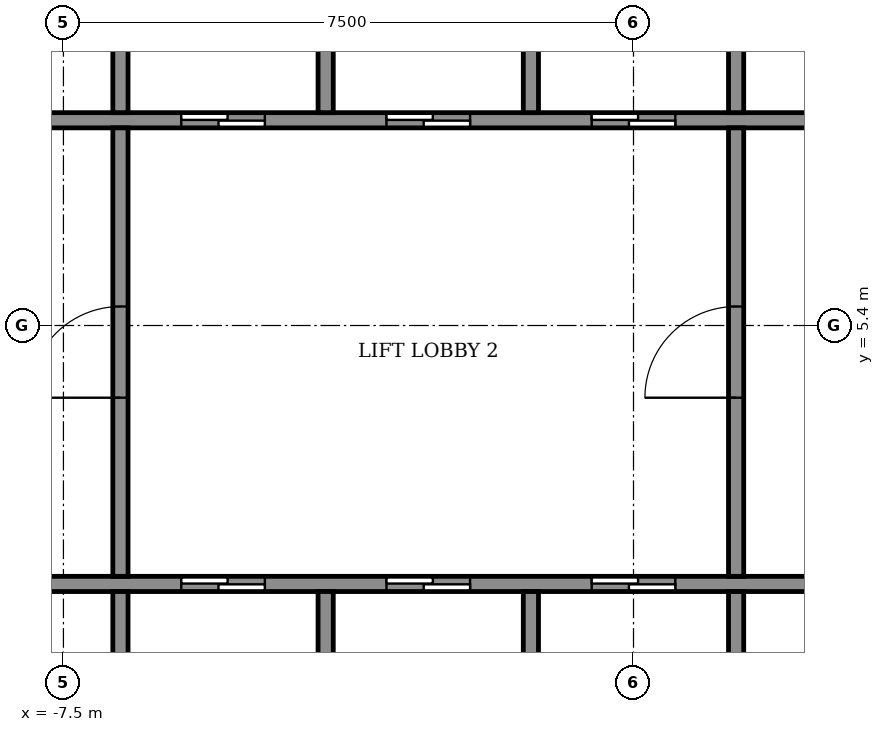
"""IFC4 building model, lengths in metres.
Left out: names, types, materials, properties, quantities, classifications, styles, units other than length and angle.
Written with IfcOpenShell. Run it as: python <this file> out.ifc"""

import sys

from ifc_helpers import new_model, si_unit, direction, frame, frame_2d, origin, place, context, subcontext, project, spatial, rectangle, extrude, element, fill, save


model = new_model("IFC4")
c1 = context("Model", 3, precision=1e-05, world=origin(), true_north=direction((0.0, 1.0)))
c2 = subcontext(c1, "Body", "Model", "MODEL_VIEW")
j1 = project(units=[si_unit("LENGTHUNIT", "METRE"), si_unit("PLANEANGLEUNIT", "RADIAN")], contexts=[c1])
p1 = place(None, origin())
s1 = spatial("IfcSite", under=j1, at=p1, CompositionType="ELEMENT")
p2 = place(p1, origin())
s2 = spatial("IfcBuilding", under=s1, at=p2, CompositionType="ELEMENT")
p3 = place(p2, frame((0.0, 0.0, 245.5)))
s3 = spatial("IfcBuildingStorey", under=s2, at=p3, CompositionType="ELEMENT", Elevation=245.5)
p4 = place(p3, frame((-10.9, 2.0, 0.0), z_axis=(0.0, 0.0, 1.0), x_axis=(1.0, 0.0, 0.0)))
e1 = element("IfcWall", 1, at=p4, inside=s3, PredefinedType="SHEAR", context=c2, shape_type="SweptSolid", body=[
    extrude(rectangle(XDim=21.8, YDim=0.2, at=frame_2d((10.9, 0.0))), origin(), (0.0, 0.0, 1.0), 3.05),
])
p5 = place(p4, frame((4.95, 0.0, 0.0)))
e2 = element("IfcOpeningElement", 2, at=p5, cuts=e1, PredefinedType="OPENING", context=c2, shape_type="SweptSolid", body=[
    extrude(rectangle(XDim=1.1, YDim=2.1, at=frame_2d((0.55, 1.05))), frame((0.0, 0.11, 0.0), z_axis=(0.0, -1.0, 0.0), x_axis=(1.0, 0.0, 0.0)), (0.0, 0.0, 1.0), 0.22),
])
p6 = place(p4, frame((7.65, 0.0, 0.0)))
e3 = element("IfcOpeningElement", 3, at=p6, cuts=e1, PredefinedType="OPENING", context=c2, shape_type="SweptSolid", body=[
    extrude(rectangle(XDim=1.1, YDim=2.1, at=frame_2d((0.55, 1.05))), frame((0.0, 0.11, 0.0), z_axis=(0.0, -1.0, 0.0), x_axis=(1.0, 0.0, 0.0)), (0.0, 0.0, 1.0), 0.22),
])
p7 = place(p4, frame((10.35, 0.0, 0.0)))
e4 = element("IfcOpeningElement", 4, at=p7, cuts=e1, PredefinedType="OPENING", context=c2, shape_type="SweptSolid", body=[
    extrude(rectangle(XDim=1.1, YDim=2.1, at=frame_2d((0.55, 1.05))), frame((0.0, 0.11, 0.0), z_axis=(0.0, -1.0, 0.0), x_axis=(1.0, 0.0, 0.0)), (0.0, 0.0, 1.0), 0.22),
])
p8 = place(p4, frame((1.675, 0.0, 0.0)))
e5 = element("IfcOpeningElement", 5, at=p8, cuts=e1, PredefinedType="OPENING", context=c2, shape_type="SweptSolid", body=[
    extrude(rectangle(XDim=0.9, YDim=2.1, at=frame_2d((0.45, 1.05))), frame((0.0, 0.11, 0.0), z_axis=(0.0, -1.0, 0.0), x_axis=(1.0, 0.0, 0.0)), (0.0, 0.0, 1.0), 0.22),
])
p9 = place(p4, frame((14.5, 0.0, 0.0)))
e6 = element("IfcOpeningElement", 6, at=p9, cuts=e1, PredefinedType="OPENING", context=c2, shape_type="SweptSolid", body=[
    extrude(rectangle(XDim=0.9, YDim=2.1, at=frame_2d((0.45, 1.05))), frame((0.0, 0.11, 0.0), z_axis=(0.0, -1.0, 0.0), x_axis=(1.0, 0.0, 0.0)), (0.0, 0.0, 1.0), 0.22),
])
p10 = place(p4, frame((19.225, 0.0, 0.0)))
e7 = element("IfcOpeningElement", 7, at=p10, cuts=e1, PredefinedType="OPENING", context=c2, shape_type="SweptSolid", body=[
    extrude(rectangle(XDim=0.9, YDim=2.1, at=frame_2d((0.45, 1.05))), frame((0.0, 0.11, 0.0), z_axis=(0.0, -1.0, 0.0), x_axis=(1.0, 0.0, 0.0)), (0.0, 0.0, 1.0), 0.22),
])
p11 = place(p3, frame((-10.9, 8.1, 0.0), z_axis=(0.0, 0.0, 1.0), x_axis=(1.0, 0.0, 0.0)))
e8 = element("IfcWall", 8, at=p11, inside=s3, PredefinedType="SHEAR", context=c2, shape_type="SweptSolid", body=[
    extrude(rectangle(XDim=21.8, YDim=0.2, at=frame_2d((10.9, 0.0))), origin(), (0.0, 0.0, 1.0), 3.05),
])
p12 = place(p11, frame((4.95, 0.0, 0.0)))
e9 = element("IfcOpeningElement", 9, at=p12, cuts=e8, PredefinedType="OPENING", context=c2, shape_type="SweptSolid", body=[
    extrude(rectangle(XDim=1.1, YDim=2.1, at=frame_2d((0.55, 1.05))), frame((0.0, 0.11, 0.0), z_axis=(0.0, -1.0, 0.0), x_axis=(1.0, 0.0, 0.0)), (0.0, 0.0, 1.0), 0.22),
])
p13 = place(p11, frame((7.65, 0.0, 0.0)))
e10 = element("IfcOpeningElement", 10, at=p13, cuts=e8, PredefinedType="OPENING", context=c2, shape_type="SweptSolid", body=[
    extrude(rectangle(XDim=1.1, YDim=2.1, at=frame_2d((0.55, 1.05))), frame((0.0, 0.11, 0.0), z_axis=(0.0, -1.0, 0.0), x_axis=(1.0, 0.0, 0.0)), (0.0, 0.0, 1.0), 0.22),
])
p14 = place(p11, frame((10.35, 0.0, 0.0)))
e11 = element("IfcOpeningElement", 11, at=p14, cuts=e8, PredefinedType="OPENING", context=c2, shape_type="SweptSolid", body=[
    extrude(rectangle(XDim=1.1, YDim=2.1, at=frame_2d((0.55, 1.05))), frame((0.0, 0.11, 0.0), z_axis=(0.0, -1.0, 0.0), x_axis=(1.0, 0.0, 0.0)), (0.0, 0.0, 1.0), 0.22),
])
p15 = place(p11, frame((1.675, 0.0, 0.0)))
e12 = element("IfcOpeningElement", 12, at=p15, cuts=e8, PredefinedType="OPENING", context=c2, shape_type="SweptSolid", body=[
    extrude(rectangle(XDim=0.9, YDim=2.1, at=frame_2d((0.45, 1.05))), frame((0.0, 0.11, 0.0), z_axis=(0.0, -1.0, 0.0), x_axis=(1.0, 0.0, 0.0)), (0.0, 0.0, 1.0), 0.22),
])
p16 = place(p11, frame((14.5, 0.0, 0.0)))
e13 = element("IfcOpeningElement", 13, at=p16, cuts=e8, PredefinedType="OPENING", context=c2, shape_type="SweptSolid", body=[
    extrude(rectangle(XDim=0.9, YDim=2.1, at=frame_2d((0.45, 1.05))), frame((0.0, 0.11, 0.0), z_axis=(0.0, -1.0, 0.0), x_axis=(1.0, 0.0, 0.0)), (0.0, 0.0, 1.0), 0.22),
])
p17 = place(p11, frame((19.225, 0.0, 0.0)))
e14 = element("IfcOpeningElement", 14, at=p17, cuts=e8, PredefinedType="OPENING", context=c2, shape_type="SweptSolid", body=[
    extrude(rectangle(XDim=0.9, YDim=2.1, at=frame_2d((0.45, 1.05))), frame((0.0, 0.11, 0.0), z_axis=(0.0, -1.0, 0.0), x_axis=(1.0, 0.0, 0.0)), (0.0, 0.0, 1.0), 0.22),
])
for number, where, z_axis, x_axis in (
    (15, (-6.75, -0.6, 0.0), (0.0, 0.0, 1.0), (0.0, 1.0, 0.0)),
    (16, (-4.05, -0.6, 0.0), (0.0, 0.0, 1.0), (0.0, 1.0, 0.0)),
    (17, (-1.35, -0.6, 0.0), (0.0, 0.0, 1.0), (0.0, 1.0, 0.0)),
    (18, (1.35, -0.6, 0.0), (0.0, 0.0, 1.0), (0.0, 1.0, 0.0)),
):
    element("IfcWall", number, at=place(p3, frame(where, z_axis=z_axis, x_axis=x_axis)), inside=s3, PredefinedType="SHEAR", context=c2, shape_type="SweptSolid", body=[
        extrude(rectangle(XDim=2.5, YDim=0.2, at=frame_2d((1.25, 0.0))), origin(), (0.0, 0.0, 1.0), 3.05),
    ])
for number, where, z_axis, x_axis in (
    (19, (-6.75, 8.2, 0.0), (0.0, 0.0, 1.0), (0.0, 1.0, 0.0)),
    (20, (-4.05, 8.2, 0.0), (0.0, 0.0, 1.0), (0.0, 1.0, 0.0)),
    (21, (-1.35, 8.2, 0.0), (0.0, 0.0, 1.0), (0.0, 1.0, 0.0)),
    (22, (1.35, 8.2, 0.0), (0.0, 0.0, 1.0), (0.0, 1.0, 0.0)),
):
    element("IfcWall", number, at=place(p3, frame(where, z_axis=z_axis, x_axis=x_axis)), inside=s3, PredefinedType="SHEAR", context=c2, shape_type="SweptSolid", body=[
        extrude(rectangle(XDim=2.6, YDim=0.2, at=frame_2d((1.3, 0.0))), origin(), (0.0, 0.0, 1.0), 3.05),
    ])
p18 = place(p3, frame((-6.75, 2.1, 0.0), z_axis=(0.0, 0.0, 1.0), x_axis=(0.0, 1.0, 0.0)))
e23 = element("IfcWall", 23, at=p18, inside=s3, PredefinedType="STANDARD", context=c2, shape_type="SweptSolid", body=[
    extrude(rectangle(XDim=5.9, YDim=0.2, at=frame_2d((2.95, 0.0))), origin(), (0.0, 0.0, 1.0), 3.05),
])
p19 = place(p18, frame((2.35, 0.0, 0.0)))
e24 = element("IfcOpeningElement", 24, at=p19, cuts=e23, PredefinedType="OPENING", context=c2, shape_type="SweptSolid", body=[
    extrude(rectangle(XDim=1.2, YDim=2.1, at=frame_2d((0.6, 1.05))), frame((0.0, 0.11, 0.0), z_axis=(0.0, -1.0, 0.0), x_axis=(1.0, 0.0, 0.0)), (0.0, 0.0, 1.0), 0.22),
])
p20 = place(p3, frame((1.35, 2.1, 0.0), z_axis=(0.0, 0.0, 1.0), x_axis=(0.0, 1.0, 0.0)))
e25 = element("IfcWall", 25, at=p20, inside=s3, PredefinedType="STANDARD", context=c2, shape_type="SweptSolid", body=[
    extrude(rectangle(XDim=5.9, YDim=0.2, at=frame_2d((2.95, 0.0))), origin(), (0.0, 0.0, 1.0), 3.05),
])
p21 = place(p20, frame((2.35, 0.0, 0.0)))
e26 = element("IfcOpeningElement", 26, at=p21, cuts=e25, PredefinedType="OPENING", context=c2, shape_type="SweptSolid", body=[
    extrude(rectangle(XDim=1.2, YDim=2.1, at=frame_2d((0.6, 1.05))), frame((0.0, 0.11, 0.0), z_axis=(0.0, -1.0, 0.0), x_axis=(1.0, 0.0, 0.0)), (0.0, 0.0, 1.0), 0.22),
])
p22 = place(p5, origin())
e27 = element("IfcDoor", 27, at=p22, inside=s3, OperationType="SLIDING_TO_LEFT", PredefinedType="DOOR", context=c2, shape_type="SweptSolid", body=[
    extrude(rectangle(XDim=1.1, YDim=2.1, at=frame_2d((0.55, 1.05))), frame((0.0, 0.025, 0.0), z_axis=(0.0, -1.0, 0.0), x_axis=(1.0, 0.0, 0.0)), (0.0, 0.0, 1.0), 0.05),
])
fill(e2, e27)
p23 = place(p6, origin())
e28 = element("IfcDoor", 28, at=p23, inside=s3, OperationType="SLIDING_TO_LEFT", PredefinedType="DOOR", context=c2, shape_type="SweptSolid", body=[
    extrude(rectangle(XDim=1.1, YDim=2.1, at=frame_2d((0.55, 1.05))), frame((0.0, 0.025, 0.0), z_axis=(0.0, -1.0, 0.0), x_axis=(1.0, 0.0, 0.0)), (0.0, 0.0, 1.0), 0.05),
])
fill(e3, e28)
p24 = place(p7, origin())
e29 = element("IfcDoor", 29, at=p24, inside=s3, OperationType="SLIDING_TO_LEFT", PredefinedType="DOOR", context=c2, shape_type="SweptSolid", body=[
    extrude(rectangle(XDim=1.1, YDim=2.1, at=frame_2d((0.55, 1.05))), frame((0.0, 0.025, 0.0), z_axis=(0.0, -1.0, 0.0), x_axis=(1.0, 0.0, 0.0)), (0.0, 0.0, 1.0), 0.05),
])
fill(e4, e29)
p25 = place(p12, origin())
e30 = element("IfcDoor", 30, at=p25, inside=s3, OperationType="SLIDING_TO_LEFT", PredefinedType="DOOR", context=c2, shape_type="SweptSolid", body=[
    extrude(rectangle(XDim=1.1, YDim=2.1, at=frame_2d((0.55, 1.05))), frame((0.0, 0.025, 0.0), z_axis=(0.0, -1.0, 0.0), x_axis=(1.0, 0.0, 0.0)), (0.0, 0.0, 1.0), 0.05),
])
fill(e9, e30)
p26 = place(p13, origin())
e31 = element("IfcDoor", 31, at=p26, inside=s3, OperationType="SLIDING_TO_LEFT", PredefinedType="DOOR", context=c2, shape_type="SweptSolid", body=[
    extrude(rectangle(XDim=1.1, YDim=2.1, at=frame_2d((0.55, 1.05))), frame((0.0, 0.025, 0.0), z_axis=(0.0, -1.0, 0.0), x_axis=(1.0, 0.0, 0.0)), (0.0, 0.0, 1.0), 0.05),
])
fill(e10, e31)
p27 = place(p14, origin())
e32 = element("IfcDoor", 32, at=p27, inside=s3, OperationType="SLIDING_TO_LEFT", PredefinedType="DOOR", context=c2, shape_type="SweptSolid", body=[
    extrude(rectangle(XDim=1.1, YDim=2.1, at=frame_2d((0.55, 1.05))), frame((0.0, 0.025, 0.0), z_axis=(0.0, -1.0, 0.0), x_axis=(1.0, 0.0, 0.0)), (0.0, 0.0, 1.0), 0.05),
])
fill(e11, e32)
p28 = place(p19, origin())
e33 = element("IfcDoor", 33, at=p28, inside=s3, OperationType="SINGLE_SWING_LEFT", PredefinedType="DOOR", context=c2, shape_type="SweptSolid", body=[
    extrude(rectangle(XDim=1.2, YDim=2.1, at=frame_2d((0.6, 1.05))), frame((0.0, 0.025, 0.0), z_axis=(0.0, -1.0, 0.0), x_axis=(1.0, 0.0, 0.0)), (0.0, 0.0, 1.0), 0.05),
])
fill(e24, e33)
p29 = place(p21, origin())
e34 = element("IfcDoor", 34, at=p29, inside=s3, OperationType="SINGLE_SWING_LEFT", PredefinedType="DOOR", context=c2, shape_type="SweptSolid", body=[
    extrude(rectangle(XDim=1.2, YDim=2.1, at=frame_2d((0.6, 1.05))), frame((0.0, 0.025, 0.0), z_axis=(0.0, -1.0, 0.0), x_axis=(1.0, 0.0, 0.0)), (0.0, 0.0, 1.0), 0.05),
])
fill(e26, e34)
save(model, sys.argv[1])
